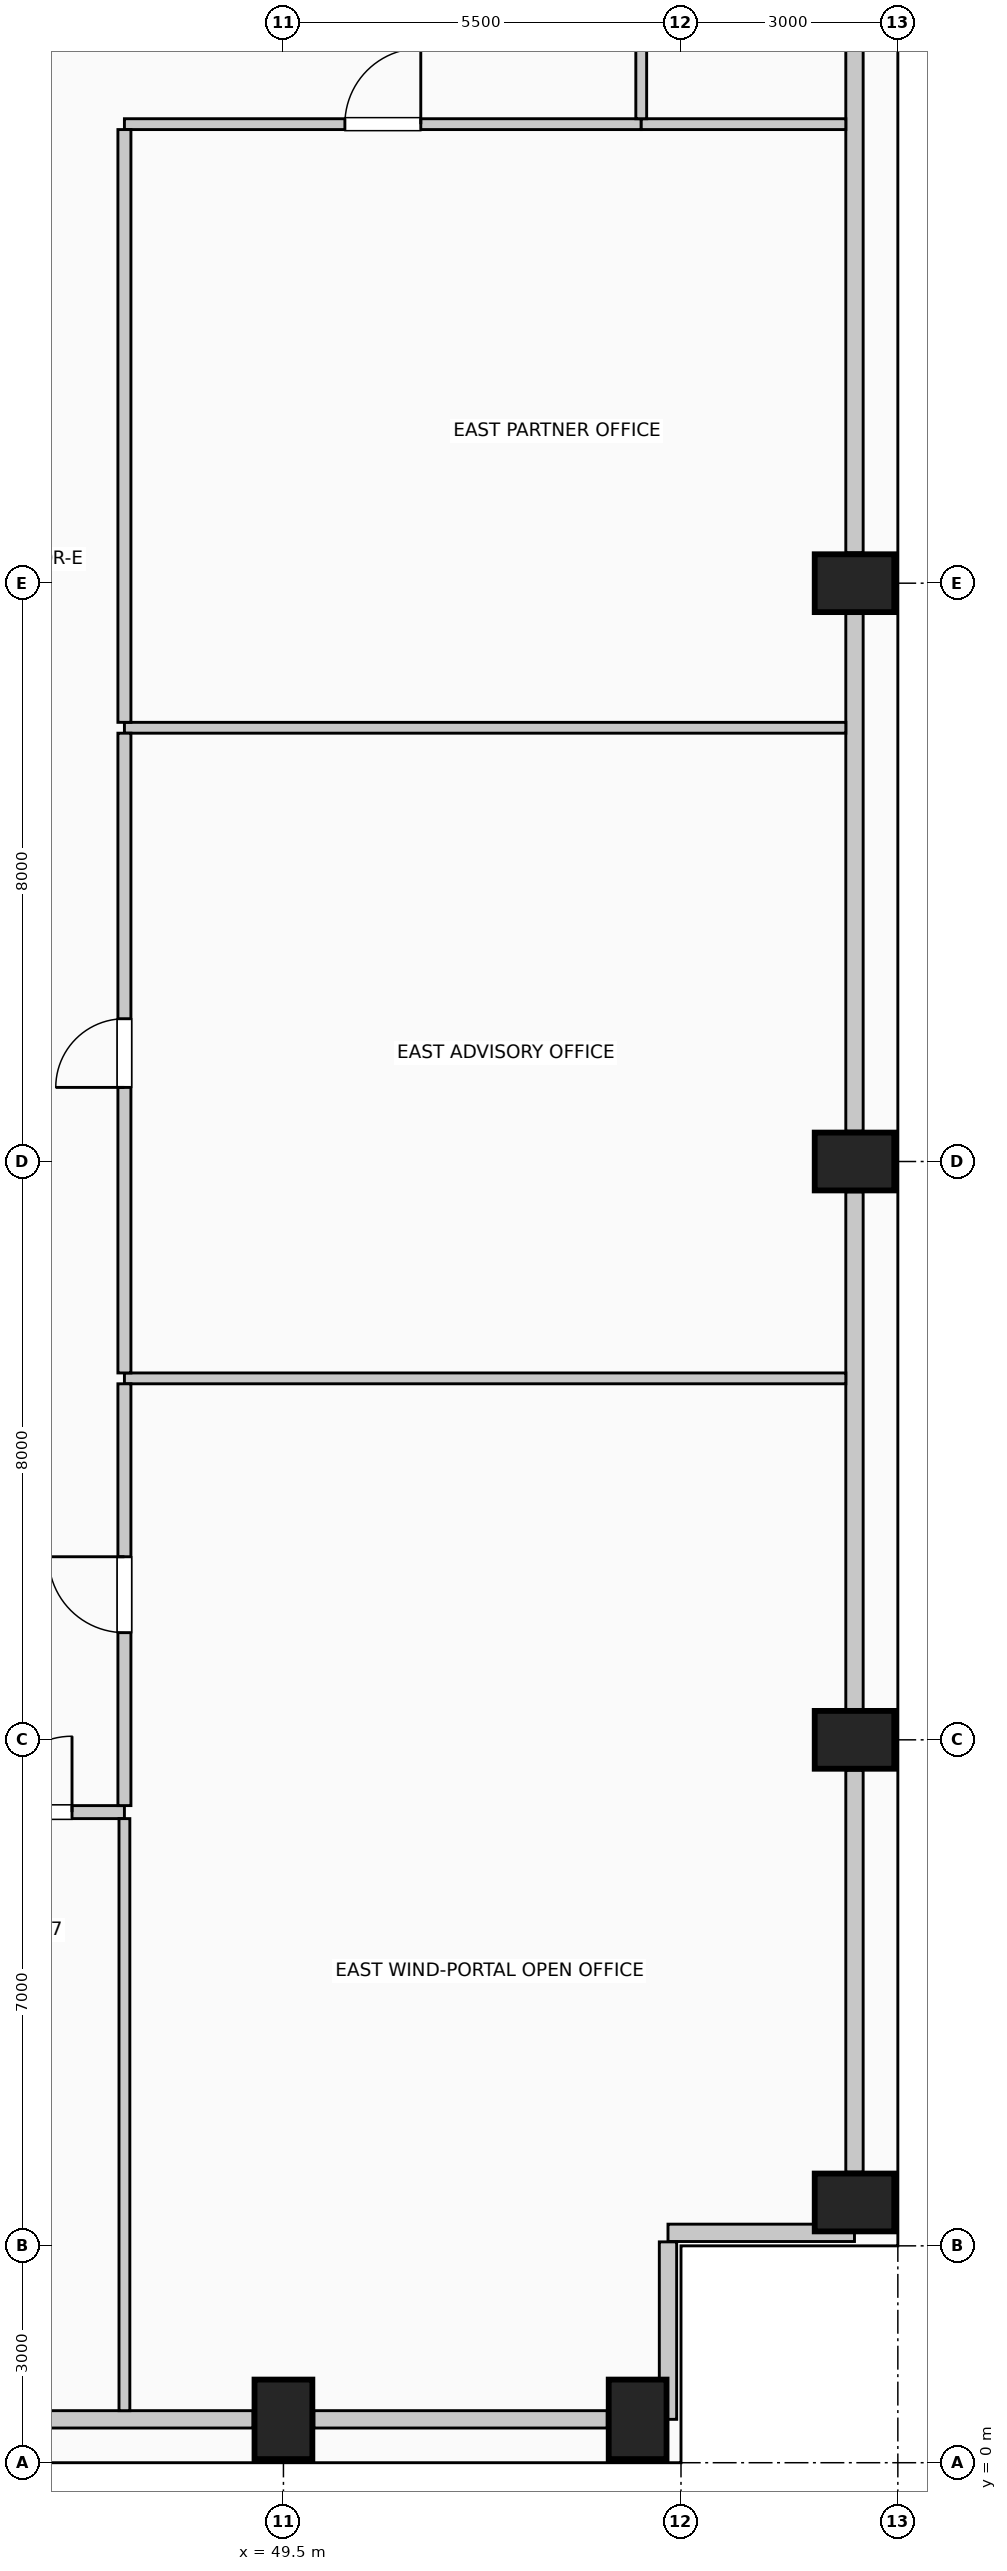
"""IFC4 building model, lengths in metres.
Left out: names, types, materials, properties, quantities, classifications, styles, units other than length and angle.
Written with IfcOpenShell. Run it as: python <this file> out.ifc"""

import sys

from ifc_helpers import new_model, si_unit, direction, frame, frame_2d, origin, origin_2d, place, context, subcontext, project, spatial, rectangle, extrude, element, fill, save


model = new_model("IFC4")
c1 = context("Model", 3, precision=1e-05, world=origin(), true_north=direction((0.0, 1.0)))
c2 = subcontext(c1, "Body", "Model", "MODEL_VIEW")
j1 = project(units=[si_unit("LENGTHUNIT", "METRE"), si_unit("PLANEANGLEUNIT", "RADIAN")], contexts=[c1])
p1 = place(None, origin())
s1 = spatial("IfcSite", under=j1, at=p1, CompositionType="ELEMENT")
p2 = place(p1, origin())
s2 = spatial("IfcBuilding", under=s1, at=p2, CompositionType="ELEMENT")
p3 = place(p2, frame((0.0, 0.0, 198.6)))
s3 = spatial("IfcBuildingStorey", under=s2, at=p3, CompositionType="ELEMENT", Elevation=198.6)
for number, where, z_axis, x_axis in (
    (1, (49.5, 0.6, 0.0), (0.0, 0.0, 1.0), (1.0, 0.0, 0.0)),
    (2, (54.4, 0.6, 0.0), (0.0, 0.0, 1.0), (1.0, 0.0, 0.0)),
    (3, (57.4, 3.6, 0.0), (0.0, 0.0, 1.0), (0.0, 1.0, 0.0)),
    (4, (57.4, 10.0, 0.0), (0.0, 0.0, 1.0), (0.0, 1.0, 0.0)),
    (5, (57.4, 18.0, 0.0), (0.0, 0.0, 1.0), (0.0, 1.0, 0.0)),
    (6, (57.4, 26.0, 0.0), (0.0, 0.0, 1.0), (0.0, 1.0, 0.0)),
):
    element("IfcColumn", number, at=place(p3, frame(where, z_axis=z_axis, x_axis=x_axis)), inside=s3, PredefinedType="COLUMN", context=c2, shape_type="SweptSolid", body=[
        extrude(rectangle(XDim=0.8, YDim=1.1, at=origin_2d()), origin(), (0.0, 0.0, 1.0), 4.0),
    ])
p4 = place(p3, frame((49.08, 0.6, 0.0), z_axis=(0.0, 0.0, 1.0), x_axis=(-1.0, 0.0, 0.0)))
e7 = element("IfcWall", 7, at=p4, inside=s3, PredefinedType="SOLIDWALL", context=c2, shape_type="SweptSolid", body=[
    extrude(rectangle(XDim=4.66, YDim=0.24, at=frame_2d((2.33, 0.0))), origin(), (0.0, 0.0, 1.0), 3.0),
])
p5 = place(p3, frame((53.98, 0.6, 0.0), z_axis=(0.0, 0.0, 1.0), x_axis=(-1.0, 0.0, 0.0)))
e8 = element("IfcWall", 8, at=p5, inside=s3, PredefinedType="SOLIDWALL", context=c2, shape_type="SweptSolid", body=[
    extrude(rectangle(XDim=4.06, YDim=0.24, at=frame_2d((2.03, 0.0))), origin(), (0.0, 0.0, 1.0), 3.0),
])
p6 = place(p3, frame((57.4, 9.58, 0.0), z_axis=(0.0, 0.0, 1.0), x_axis=(0.0, -1.0, 0.0)))
e9 = element("IfcWall", 9, at=p6, inside=s3, PredefinedType="SOLIDWALL", context=c2, shape_type="SweptSolid", body=[
    extrude(rectangle(XDim=5.56, YDim=0.24, at=frame_2d((2.78, 0.0))), origin(), (0.0, 0.0, 1.0), 3.0),
])
for number, where, z_axis, x_axis in (
    (10, (57.4, 17.58, 0.0), (0.0, 0.0, 1.0), (0.0, -1.0, 0.0)),
    (11, (57.4, 25.58, 0.0), (0.0, 0.0, 1.0), (0.0, -1.0, 0.0)),
    (12, (57.4, 33.58, 0.0), (0.0, 0.0, 1.0), (0.0, -1.0, 0.0)),
):
    element("IfcWall", number, at=place(p3, frame(where, z_axis=z_axis, x_axis=x_axis)), inside=s3, PredefinedType="SOLIDWALL", context=c2, shape_type="SweptSolid", body=[
        extrude(rectangle(XDim=7.16, YDim=0.24, at=frame_2d((3.58, 0.0))), origin(), (0.0, 0.0, 1.0), 3.0),
    ])
p7 = place(p3, frame((57.4, 3.18, 0.0), z_axis=(0.0, 0.0, 1.0), x_axis=(-1.0, 0.0, 0.0)))
e13 = element("IfcWall", 13, at=p7, inside=s3, PredefinedType="SOLIDWALL", context=c2, shape_type="SweptSolid", body=[
    extrude(rectangle(XDim=2.58, YDim=0.24, at=frame_2d((1.29, 0.0))), origin(), (0.0, 0.0, 1.0), 3.75),
])
p8 = place(p3, frame((54.82, 3.055, 0.0), z_axis=(0.0, 0.0, 1.0), x_axis=(0.0, -1.0, 0.0)))
e14 = element("IfcWall", 14, at=p8, inside=s3, PredefinedType="SOLIDWALL", context=c2, shape_type="SweptSolid", body=[
    extrude(rectangle(XDim=2.455, YDim=0.24, at=frame_2d((1.228, 0.0))), origin(), (0.0, 0.0, 1.0), 3.75),
])
p9 = place(p3, frame((44.8, 9.0, 0.0), z_axis=(0.0, 0.0, 1.0), x_axis=(1.0, 0.0, 0.0)))
e15 = element("IfcWall", 15, at=p9, inside=s3, PredefinedType="PARTITIONING", context=c2, shape_type="SweptSolid", body=[
    extrude(rectangle(XDim=2.5, YDim=0.18, at=frame_2d((1.25, 0.0))), origin(), (0.0, 0.0, 1.0), 3.75),
])
p10 = place(p9, frame((0.725, 0.0, 0.0)))
e16 = element("IfcOpeningElement", 16, at=p10, cuts=e15, PredefinedType="OPENING", context=c2, shape_type="SweptSolid", body=[
    extrude(rectangle(XDim=1.05, YDim=2.15, at=frame_2d((0.525, 1.075))), frame((0.0, 0.1, 0.0), z_axis=(0.0, -1.0, 0.0), x_axis=(1.0, 0.0, 0.0)), (0.0, 0.0, 1.0), 0.2),
])
p11 = place(p3, frame((47.3, 15.0, 0.0), z_axis=(0.0, 0.0, 1.0), x_axis=(1.0, 0.0, 0.0)))
e17 = element("IfcWall", 17, at=p11, inside=s3, PredefinedType="PARTITIONING", context=c2, shape_type="SweptSolid", body=[
    extrude(rectangle(XDim=9.98, YDim=0.15, at=frame_2d((4.99, 0.0))), origin(), (0.0, 0.0, 1.0), 3.245),
])
p12 = place(p3, frame((47.3, 24.0, 0.0), z_axis=(0.0, 0.0, 1.0), x_axis=(1.0, 0.0, 0.0)))
e18 = element("IfcWall", 18, at=p12, inside=s3, PredefinedType="PARTITIONING", context=c2, shape_type="SweptSolid", body=[
    extrude(rectangle(XDim=9.98, YDim=0.15, at=frame_2d((4.99, 0.0))), origin(), (0.0, 0.0, 1.0), 3.75),
])
p13 = place(p3, frame((47.3, 32.35, 0.0), z_axis=(0.0, 0.0, 1.0), x_axis=(1.0, 0.0, 0.0)))
e19 = element("IfcWall", 19, at=p13, inside=s3, PredefinedType="PARTITIONING", context=c2, shape_type="SweptSolid", body=[
    extrude(rectangle(XDim=7.15, YDim=0.15, at=frame_2d((3.575, 0.0))), origin(), (0.0, 0.0, 1.0), 3.75),
])
p14 = place(p13, frame((3.05, 0.0, 0.0)))
e20 = element("IfcOpeningElement", 20, at=p14, cuts=e19, PredefinedType="OPENING", context=c2, shape_type="SweptSolid", body=[
    extrude(rectangle(XDim=1.05, YDim=2.15, at=frame_2d((0.525, 1.075))), frame((0.0, 0.085, 0.0), z_axis=(0.0, -1.0, 0.0), x_axis=(1.0, 0.0, 0.0)), (0.0, 0.0, 1.0), 0.17),
])
p15 = place(p3, frame((54.45, 32.35, 0.0), z_axis=(0.0, 0.0, 1.0), x_axis=(1.0, 0.0, 0.0)))
e21 = element("IfcWall", 21, at=p15, inside=s3, PredefinedType="PARTITIONING", context=c2, shape_type="SweptSolid", body=[
    extrude(rectangle(XDim=2.83, YDim=0.15, at=frame_2d((1.415, 0.0))), origin(), (0.0, 0.0, 1.0), 3.75),
])
p16 = place(p3, frame((47.3, 0.72, 0.0), z_axis=(0.0, 0.0, 1.0), x_axis=(0.0, 1.0, 0.0)))
e22 = element("IfcWall", 22, at=p16, inside=s3, PredefinedType="PARTITIONING", context=c2, shape_type="SweptSolid", body=[
    extrude(rectangle(XDim=8.19, YDim=0.15, at=frame_2d((4.095, 0.0))), origin(), (0.0, 0.0, 1.0), 3.75),
])
p17 = place(p3, frame((47.3, 9.09, 0.0), z_axis=(0.0, 0.0, 1.0), x_axis=(0.0, 1.0, 0.0)))
e23 = element("IfcWall", 23, at=p17, inside=s3, PredefinedType="PARTITIONING", context=c2, shape_type="SweptSolid", body=[
    extrude(rectangle(XDim=5.835, YDim=0.18, at=frame_2d((2.917, 0.0))), origin(), (0.0, 0.0, 1.0), 3.75),
])
p18 = place(p17, frame((2.393, 0.0, 0.0)))
e24 = element("IfcOpeningElement", 24, at=p18, cuts=e23, PredefinedType="OPENING", context=c2, shape_type="SweptSolid", body=[
    extrude(rectangle(XDim=1.05, YDim=2.15, at=frame_2d((0.525, 1.075))), frame((0.0, 0.1, 0.0), z_axis=(0.0, -1.0, 0.0), x_axis=(1.0, 0.0, 0.0)), (0.0, 0.0, 1.0), 0.2),
])
p19 = place(p3, frame((47.3, 15.075, 0.0), z_axis=(0.0, 0.0, 1.0), x_axis=(0.0, 1.0, 0.0)))
e25 = element("IfcWall", 25, at=p19, inside=s3, PredefinedType="PARTITIONING", context=c2, shape_type="SweptSolid", body=[
    extrude(rectangle(XDim=8.85, YDim=0.18, at=frame_2d((4.425, 0.0))), origin(), (0.0, 0.0, 1.0), 3.75),
])
p20 = place(p19, frame((3.95, 0.0, 0.0)))
e26 = element("IfcOpeningElement", 26, at=p20, cuts=e25, PredefinedType="OPENING", context=c2, shape_type="SweptSolid", body=[
    extrude(rectangle(XDim=0.95, YDim=2.15, at=frame_2d((0.475, 1.075))), frame((0.0, 0.1, 0.0), z_axis=(0.0, -1.0, 0.0), x_axis=(1.0, 0.0, 0.0)), (0.0, 0.0, 1.0), 0.2),
])
p21 = place(p3, frame((47.3, 24.075, 0.0), z_axis=(0.0, 0.0, 1.0), x_axis=(0.0, 1.0, 0.0)))
e27 = element("IfcWall", 27, at=p21, inside=s3, PredefinedType="PARTITIONING", context=c2, shape_type="SweptSolid", body=[
    extrude(rectangle(XDim=8.2, YDim=0.18, at=frame_2d((4.1, 0.0))), origin(), (0.0, 0.0, 1.0), 3.75),
])
p22 = place(p3, frame((54.45, 32.425, 0.0), z_axis=(0.0, 0.0, 1.0), x_axis=(0.0, 1.0, 0.0)))
e28 = element("IfcWall", 28, at=p22, inside=s3, PredefinedType="PARTITIONING", context=c2, shape_type="SweptSolid", body=[
    extrude(rectangle(XDim=1.725, YDim=0.15, at=frame_2d((0.862, 0.0))), origin(), (0.0, 0.0, 1.0), 3.75),
])
p23 = place(p10, origin())
e29 = element("IfcDoor", 29, at=p23, inside=s3, OperationType="SINGLE_SWING_RIGHT", PredefinedType="DOOR", context=c2, shape_type="SweptSolid", body=[
    extrude(rectangle(XDim=1.05, YDim=2.15, at=frame_2d((0.525, 1.075))), frame((0.0, 0.025, 0.0), z_axis=(0.0, -1.0, 0.0), x_axis=(1.0, 0.0, 0.0)), (0.0, 0.0, 1.0), 0.05),
])
fill(e16, e29)
p24 = place(p14, origin())
e30 = element("IfcDoor", 30, at=p24, inside=s3, OperationType="SINGLE_SWING_RIGHT", PredefinedType="DOOR", context=c2, shape_type="SweptSolid", body=[
    extrude(rectangle(XDim=1.05, YDim=2.15, at=frame_2d((0.525, 1.075))), frame((0.0, 0.025, 0.0), z_axis=(0.0, -1.0, 0.0), x_axis=(1.0, 0.0, 0.0)), (0.0, 0.0, 1.0), 0.05),
])
fill(e20, e30)
p25 = place(p18, origin())
e31 = element("IfcDoor", 31, at=p25, inside=s3, OperationType="SINGLE_SWING_RIGHT", PredefinedType="DOOR", context=c2, shape_type="SweptSolid", body=[
    extrude(rectangle(XDim=1.05, YDim=2.15, at=frame_2d((0.525, 1.075))), frame((0.0, 0.025, 0.0), z_axis=(0.0, -1.0, 0.0), x_axis=(1.0, 0.0, 0.0)), (0.0, 0.0, 1.0), 0.05),
])
fill(e24, e31)
p26 = place(p20, origin())
e32 = element("IfcDoor", 32, at=p26, inside=s3, OperationType="SINGLE_SWING_LEFT", PredefinedType="DOOR", context=c2, shape_type="SweptSolid", body=[
    extrude(rectangle(XDim=0.95, YDim=2.15, at=frame_2d((0.475, 1.075))), frame((0.0, 0.025, 0.0), z_axis=(0.0, -1.0, 0.0), x_axis=(1.0, 0.0, 0.0)), (0.0, 0.0, 1.0), 0.05),
])
fill(e26, e32)
save(model, sys.argv[1])
